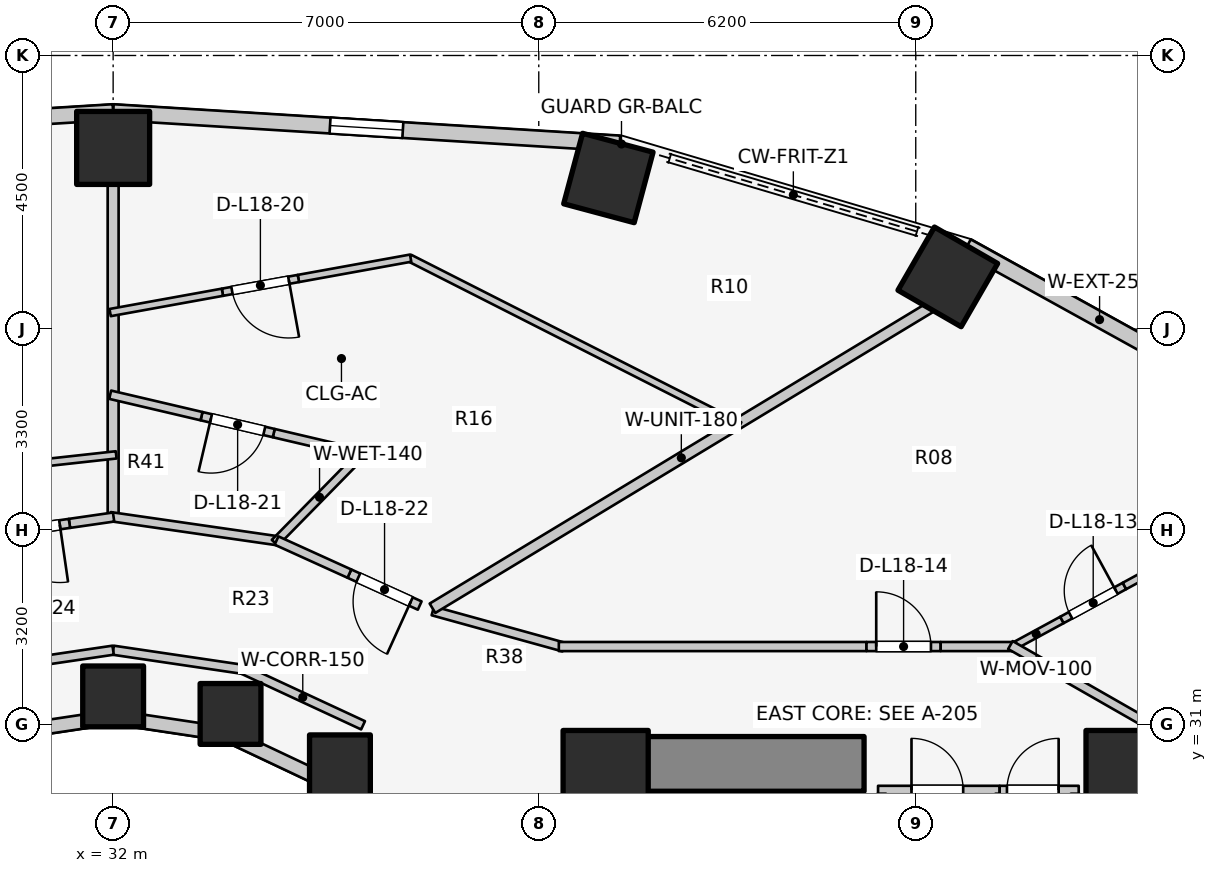
"""IFC4 building model, lengths in metres.
Left out: names, types, materials, properties, quantities, classifications, styles, units other than length and angle.
Written with IfcOpenShell. Run it as: python <this file> out.ifc"""

import sys

from ifc_helpers import new_model, si_unit, direction, frame, frame_2d, origin, origin_2d, place, context, subcontext, project, spatial, rectangle, extrude, element, fill, save


model = new_model("IFC4")
c1 = context("Model", 3, precision=1e-05, world=origin(), true_north=direction((0.0, 1.0)))
c2 = subcontext(c1, "Body", "Model", "MODEL_VIEW")
j1 = project(units=[si_unit("LENGTHUNIT", "METRE"), si_unit("PLANEANGLEUNIT", "RADIAN")], contexts=[c1])
p1 = place(None, origin())
s1 = spatial("IfcSite", under=j1, at=p1, CompositionType="ELEMENT")
p2 = place(p1, origin())
s2 = spatial("IfcBuilding", under=s1, at=p2, CompositionType="ELEMENT")
p3 = place(p2, frame((0.0, 0.0, 61.7)))
s3 = spatial("IfcBuildingStorey", under=s2, at=p3, CompositionType="ELEMENT", Elevation=61.7)
p4 = place(p3, frame((39.85, 30.35, 0.0), z_axis=(0.0, 0.0, 1.0), x_axis=(1.0, 0.0, 0.0)))
e1 = element("IfcWall", 1, at=p4, inside=s3, PredefinedType="SHEAR", context=c2, shape_type="SweptSolid", body=[
    extrude(rectangle(XDim=4.5, YDim=0.9, at=frame_2d((2.25, 0.0))), origin(), (0.0, 0.0, 1.0), 3.1),
])
for number, where, z_axis, x_axis in (
    (2, (48.7, 30.2, 0.0), (0.0, 0.0, 1.0), (1.0, 0.0, 0.0)),
    (3, (40.1, 30.2, 0.0), (0.0, 0.0, 1.0), (1.0, 0.0, 0.0)),
):
    element("IfcColumn", number, at=place(p3, frame(where, z_axis=z_axis, x_axis=x_axis)), inside=s3, PredefinedType="COLUMN", context=c2, shape_type="SweptSolid", body=[
        extrude(rectangle(XDim=1.4, YDim=1.4, at=origin_2d()), origin(), (0.0, 0.0, 1.0), 3.1),
    ])
p5 = place(p3, frame((35.73, 30.327, 0.0), z_axis=(0.0, 0.0, 1.0), x_axis=(1.0, 0.0, 0.0)))
e4 = element("IfcColumn", 4, at=p5, inside=s3, PredefinedType="COLUMN", context=c2, shape_type="SweptSolid", body=[
    extrude(rectangle(XDim=1.0, YDim=1.0, at=origin_2d()), origin(), (0.0, 0.0, 1.0), 3.1),
])
p6 = place(p3, frame((45.727, 38.359, 0.0), z_axis=(0.0, 0.0, 1.0), x_axis=(0.5, 0.866025403784, 0.0)))
e5 = element("IfcColumn", 5, at=p6, inside=s3, PredefinedType="COLUMN", context=c2, shape_type="SweptSolid", body=[
    extrude(rectangle(XDim=1.2, YDim=1.2, at=origin_2d()), origin(), (0.0, 0.0, 1.0), 3.1),
])
p7 = place(p3, frame((33.931, 31.172, 0.0), z_axis=(0.0, 0.0, 1.0), x_axis=(1.0, 0.0, 0.0)))
e6 = element("IfcColumn", 6, at=p7, inside=s3, PredefinedType="COLUMN", context=c2, shape_type="SweptSolid", body=[
    extrude(rectangle(XDim=1.0, YDim=1.0, at=origin_2d()), origin(), (0.0, 0.0, 1.0), 3.1),
])
p8 = place(p3, frame((40.145, 39.986, 0.0), z_axis=(0.0, 0.0, 1.0), x_axis=(0.258819045103, 0.965925826289, 0.0)))
e7 = element("IfcColumn", 7, at=p8, inside=s3, PredefinedType="COLUMN", context=c2, shape_type="SweptSolid", body=[
    extrude(rectangle(XDim=1.2, YDim=1.2, at=origin_2d()), origin(), (0.0, 0.0, 1.0), 3.1),
])
p9 = place(p3, frame((32.0, 31.46, 0.0), z_axis=(0.0, 0.0, 1.0), x_axis=(1.0, 0.0, 0.0)))
e8 = element("IfcColumn", 8, at=p9, inside=s3, PredefinedType="COLUMN", context=c2, shape_type="SweptSolid", body=[
    extrude(rectangle(XDim=1.0, YDim=1.0, at=origin_2d()), origin(), (0.0, 0.0, 1.0), 3.1),
])
p10 = place(p3, frame((32.0, 40.48, 0.0), z_axis=(0.0, 0.0, 1.0), x_axis=(0.0, 1.0, 0.0)))
e9 = element("IfcColumn", 9, at=p10, inside=s3, PredefinedType="COLUMN", context=c2, shape_type="SweptSolid", body=[
    extrude(rectangle(XDim=1.2, YDim=1.2, at=origin_2d()), origin(), (0.0, 0.0, 1.0), 3.1),
])
p11 = place(p3, frame((37.035, 28.742, 0.0), z_axis=(0.0, 0.0, 1.0), x_axis=(-0.752576694707, 0.658504607869, 0.0)))
e10 = element("IfcWall", 10, at=p11, inside=s3, PredefinedType="STANDARD", context=c2, shape_type="SweptSolid", body=[
    extrude(rectangle(XDim=1.959, YDim=0.23, at=frame_2d((0.98, 0.0))), origin(), (0.0, 0.0, 1.0), 1.22),
])
p12 = place(p3, frame((35.56, 30.032, 0.0), z_axis=(0.0, 0.0, 1.0), x_axis=(-0.904179699603, 0.427152280606, 0.0)))
e11 = element("IfcWall", 11, at=p12, inside=s3, PredefinedType="STANDARD", context=c2, shape_type="SweptSolid", body=[
    extrude(rectangle(XDim=1.899, YDim=0.23, at=frame_2d((0.95, 0.0))), origin(), (0.0, 0.0, 1.0), 1.22),
])
for number, where, z_axis, x_axis in (
    (12, (33.843, 30.843, 0.0), (0.0, 0.0, 1.0), (-0.989, 0.149, 0.0)),
    (13, (32.0, 31.12, 0.0), (0.0, 0.0, 1.0), (-0.989, -0.149, 0.0)),
):
    element("IfcWall", number, at=place(p3, frame(where, z_axis=z_axis, x_axis=x_axis)), inside=s3, PredefinedType="STANDARD", context=c2, shape_type="SweptSolid", body=[
        extrude(rectangle(XDim=1.864, YDim=0.23, at=frame_2d((0.932, 0.0))), origin(), (0.0, 0.0, 1.0), 1.22),
    ])
p13 = place(p3, frame((50.405, 36.45, 0.0), z_axis=(0.0, 0.0, 1.0), x_axis=(-0.875137303239, 0.483874674352, 0.0)))
e14 = element("IfcWall", 14, at=p13, inside=s3, PredefinedType="STANDARD", context=c2, shape_type="SweptSolid", body=[
    extrude(rectangle(XDim=4.985, YDim=0.26, at=frame_2d((2.493, 0.0))), origin(), (0.0, 0.0, 1.0), 1.22),
])
p14 = place(p3, frame((40.332, 40.553, 0.0), z_axis=(0.0, 0.0, 1.0), x_axis=(-0.998090514779, 0.061768311519, 0.0)))
e15 = element("IfcWall", 15, at=p14, inside=s3, PredefinedType="STANDARD", context=c2, shape_type="SweptSolid", body=[
    extrude(rectangle(XDim=8.348, YDim=0.26, at=frame_2d((4.174, 0.0))), origin(), (0.0, 0.0, 1.0), 1.22),
])
p15 = place(p14, frame((3.574, 0.0, 0.15)))
e16 = element("IfcOpeningElement", 16, at=p15, cuts=e15, PredefinedType="OPENING", context=c2, shape_type="SweptSolid", body=[
    extrude(rectangle(XDim=1.2, YDim=0.9, at=frame_2d((0.6, 0.45))), frame((0.0, 0.14, 0.0), z_axis=(0.0, -1.0, 0.0), x_axis=(1.0, 0.0, 0.0)), (0.0, 0.0, 1.0), 0.28),
])
p16 = place(p3, frame((32.0, 41.069, 0.0), z_axis=(0.0, 0.0, 1.0), x_axis=(-0.998090514779, -0.061768311519, 0.0)))
e17 = element("IfcWall", 17, at=p16, inside=s3, PredefinedType="STANDARD", context=c2, shape_type="SweptSolid", body=[
    extrude(rectangle(XDim=8.348, YDim=0.26, at=frame_2d((4.174, 0.0))), origin(), (0.0, 0.0, 1.0), 1.22),
])
p17 = place(p16, frame((3.574, 0.0, 0.15)))
e18 = element("IfcOpeningElement", 18, at=p17, cuts=e17, PredefinedType="OPENING", context=c2, shape_type="SweptSolid", body=[
    extrude(rectangle(XDim=1.2, YDim=0.9, at=frame_2d((0.6, 0.45))), frame((0.0, 0.14, 0.0), z_axis=(0.0, -1.0, 0.0), x_axis=(1.0, 0.0, 0.0)), (0.0, 0.0, 1.0), 0.28),
])
p18 = place(p3, frame((44.58, 29.92, 0.0), z_axis=(0.0, 0.0, 1.0), x_axis=(1.0, 0.0, 0.0)))
e19 = element("IfcWall", 19, at=p18, inside=s3, PredefinedType="PLUMBINGWALL", context=c2, shape_type="SweptSolid", body=[
    extrude(rectangle(XDim=2.0, YDim=0.14, at=frame_2d((1.0, 0.0))), origin(), (0.0, 0.0, 1.0), 2.575),
])
p19 = place(p18, frame((0.55, 0.0, 0.0)))
e20 = element("IfcOpeningElement", 20, at=p19, cuts=e19, PredefinedType="OPENING", context=c2, shape_type="SweptSolid", body=[
    extrude(rectangle(XDim=0.85, YDim=2.05, at=frame_2d((0.425, 1.025))), frame((0.0, 0.08, 0.0), z_axis=(0.0, -1.0, 0.0), x_axis=(1.0, 0.0, 0.0)), (0.0, 0.0, 1.0), 0.16),
])
p20 = place(p3, frame((46.58, 29.92, 0.0), z_axis=(0.0, 0.0, 1.0), x_axis=(1.0, 0.0, 0.0)))
e21 = element("IfcWall", 21, at=p20, inside=s3, PredefinedType="PLUMBINGWALL", context=c2, shape_type="SweptSolid", body=[
    extrude(rectangle(XDim=1.3, YDim=0.14, at=frame_2d((0.65, 0.0))), origin(), (0.0, 0.0, 1.0), 2.575),
])
p21 = place(p20, frame((0.12, 0.0, 0.0)))
e22 = element("IfcOpeningElement", 22, at=p21, cuts=e21, PredefinedType="OPENING", context=c2, shape_type="SweptSolid", body=[
    extrude(rectangle(XDim=0.85, YDim=2.05, at=frame_2d((0.425, 1.025))), frame((0.0, 0.08, 0.0), z_axis=(0.0, -1.0, 0.0), x_axis=(1.0, 0.0, 0.0)), (0.0, 0.0, 1.0), 0.16),
])
p22 = place(p3, frame((36.11, 30.985, 0.0), z_axis=(0.0, 0.0, 1.0), x_axis=(-0.906943449489, 0.421252393975, 0.0)))
e23 = element("IfcWall", 23, at=p22, inside=s3, PredefinedType="PARTITIONING", context=c2, shape_type="SweptSolid", body=[
    extrude(rectangle(XDim=2.186, YDim=0.15, at=frame_2d((1.093, 0.0))), origin(), (0.0, 0.0, 1.0), 1.22),
])
for number, where, z_axis, x_axis in (
    (24, (34.127, 31.906, 0.0), (0.0, 0.0, 1.0), (-0.989, 0.146, 0.0)),
    (25, (32.0, 32.22, 0.0), (0.0, 0.0, 1.0), (-0.989, -0.146, 0.0)),
):
    element("IfcWall", number, at=place(p3, frame(where, z_axis=z_axis, x_axis=x_axis)), inside=s3, PredefinedType="PARTITIONING", context=c2, shape_type="SweptSolid", body=[
        extrude(rectangle(XDim=2.151, YDim=0.15, at=frame_2d((1.075, 0.0))), origin(), (0.0, 0.0, 1.0), 1.22),
    ])
p23 = place(p3, frame((46.756, 32.256, 0.0), z_axis=(0.0, 0.0, 1.0), x_axis=(0.878580692024, 0.477593935894, 0.0)))
e26 = element("IfcWall", 26, at=p23, inside=s3, PredefinedType="MOVABLE", context=c2, shape_type="SweptSolid", body=[
    extrude(rectangle(XDim=0.966, YDim=0.12, at=frame_2d((0.483, 0.0))), origin(), (0.0, 0.0, 1.0), 2.575),
])
p24 = place(p3, frame((47.604, 32.717, 0.0), z_axis=(0.0, 0.0, 1.0), x_axis=(0.878540750178, 0.4776674055, 0.0)))
e27 = element("IfcWall", 27, at=p24, inside=s3, PredefinedType="MOVABLE", context=c2, shape_type="SweptSolid", body=[
    extrude(rectangle(XDim=1.17, YDim=0.12, at=frame_2d((0.585, 0.0))), origin(), (0.0, 0.0, 1.0), 2.11),
])
p25 = place(p24, frame((0.16, 0.0, 0.0)))
e28 = element("IfcOpeningElement", 28, at=p25, cuts=e27, PredefinedType="OPENING", context=c2, shape_type="SweptSolid", body=[
    extrude(rectangle(XDim=0.85, YDim=2.05, at=frame_2d((0.425, 1.025))), frame((0.0, 0.07, 0.0), z_axis=(0.0, -1.0, 0.0), x_axis=(1.0, 0.0, 0.0)), (0.0, 0.0, 1.0), 0.14),
])
p26 = place(p3, frame((48.632, 33.276, 0.0), z_axis=(0.0, 0.0, 1.0), x_axis=(0.878543913196, 0.477661587932, 0.0)))
e29 = element("IfcWall", 29, at=p26, inside=s3, PredefinedType="MOVABLE", context=c2, shape_type="SweptSolid", body=[
    extrude(rectangle(XDim=3.924, YDim=0.12, at=frame_2d((1.962, 0.0))), origin(), (0.0, 0.0, 1.0), 1.22),
])
p27 = place(p3, frame((37.258, 32.867, 0.0), z_axis=(0.0, 0.0, 1.0), x_axis=(0.963833843713, -0.266503886865, 0.0)))
e30 = element("IfcWall", 30, at=p27, inside=s3, PredefinedType="PARTITIONING", context=c2, shape_type="SweptSolid", body=[
    extrude(rectangle(XDim=2.232, YDim=0.15, at=frame_2d((1.116, 0.0))), origin(), (0.0, 0.0, 1.0), 1.22),
])
p28 = place(p3, frame((39.33, 32.28, 0.0), z_axis=(0.0, 0.0, 1.0), x_axis=(1.0, 0.0, 0.0)))
e31 = element("IfcWall", 31, at=p28, inside=s3, PredefinedType="PARTITIONING", context=c2, shape_type="SweptSolid", body=[
    extrude(rectangle(XDim=5.06, YDim=0.15, at=frame_2d((2.53, 0.0))), origin(), (0.0, 0.0, 1.0), 1.22),
])
p29 = place(p3, frame((44.39, 32.28, 0.0), z_axis=(0.0, 0.0, 1.0), x_axis=(1.0, 0.0, 0.0)))
e32 = element("IfcWall", 32, at=p29, inside=s3, PredefinedType="PARTITIONING", context=c2, shape_type="SweptSolid", body=[
    extrude(rectangle(XDim=1.22, YDim=0.15, at=frame_2d((0.61, 0.0))), origin(), (0.0, 0.0, 1.0), 2.16),
])
p30 = place(p29, frame((0.16, 0.0, 0.0)))
e33 = element("IfcOpeningElement", 33, at=p30, cuts=e32, PredefinedType="OPENING", context=c2, shape_type="SweptSolid", body=[
    extrude(rectangle(XDim=0.9, YDim=2.1, at=frame_2d((0.45, 1.05))), frame((0.0, 0.085, 0.0), z_axis=(0.0, -1.0, 0.0), x_axis=(1.0, 0.0, 0.0)), (0.0, 0.0, 1.0), 0.17),
])
p31 = place(p3, frame((45.61, 32.28, 0.0), z_axis=(0.0, 0.0, 1.0), x_axis=(1.0, 0.0, 0.0)))
e34 = element("IfcWall", 34, at=p31, inside=s3, PredefinedType="PARTITIONING", context=c2, shape_type="SweptSolid", body=[
    extrude(rectangle(XDim=1.24, YDim=0.15, at=frame_2d((0.62, 0.0))), origin(), (0.0, 0.0, 1.0), 2.575),
])
p32 = place(p3, frame((46.757, 32.305, 0.0), z_axis=(0.0, 0.0, 1.0), x_axis=(0.867991349648, -0.496579315857, 0.0)))
e35 = element("IfcWall", 35, at=p32, inside=s3, PredefinedType="PARTITIONING", context=c2, shape_type="SweptSolid", body=[
    extrude(rectangle(XDim=2.567, YDim=0.15, at=frame_2d((1.283, 0.0))), origin(), (0.0, 0.0, 1.0), 1.22),
])
p33 = place(p3, frame((37.252, 32.91, 0.0), z_axis=(0.0, 0.0, 1.0), x_axis=(0.855817136021, 0.517278483694, 0.0)))
e36 = element("IfcWall", 36, at=p33, inside=s3, PredefinedType="PARTITIONING", context=c2, shape_type="SweptSolid", body=[
    extrude(rectangle(XDim=9.564, YDim=0.18, at=frame_2d((4.782, 0.0))), origin(), (0.0, 0.0, 1.0), 1.22),
])
p34 = place(p3, frame((32.0, 34.465, 0.0), z_axis=(0.0, 0.0, 1.0), x_axis=(0.0, 1.0, 0.0)))
e37 = element("IfcWall", 37, at=p34, inside=s3, PredefinedType="PARTITIONING", context=c2, shape_type="SweptSolid", body=[
    extrude(rectangle(XDim=5.435, YDim=0.18, at=frame_2d((2.717, 0.0))), origin(), (0.0, 0.0, 1.0), 1.22),
])
p35 = place(p3, frame((42.305, 35.914, 0.0), z_axis=(0.0, 0.0, 1.0), x_axis=(-0.891749407737, 0.452529550195, 0.0)))
e38 = element("IfcWall", 38, at=p35, inside=s3, PredefinedType="MOVABLE", context=c2, shape_type="SweptSolid", body=[
    extrude(rectangle(XDim=6.09, YDim=0.12, at=frame_2d((3.045, 0.0))), origin(), (0.0, 0.0, 1.0), 1.22),
])
p36 = place(p3, frame((36.893, 38.667, 0.0), z_axis=(0.0, 0.0, 1.0), x_axis=(-0.984000828306, -0.178163884929, 0.0)))
e39 = element("IfcWall", 39, at=p36, inside=s3, PredefinedType="MOVABLE", context=c2, shape_type="SweptSolid", body=[
    extrude(rectangle(XDim=1.876, YDim=0.12, at=frame_2d((0.938, 0.0))), origin(), (0.0, 0.0, 1.0), 2.575),
])
p37 = place(p3, frame((35.047, 38.333, 0.0), z_axis=(0.0, 0.0, 1.0), x_axis=(-0.983955925846, -0.178411703631, 0.0)))
e40 = element("IfcWall", 40, at=p37, inside=s3, PredefinedType="MOVABLE", context=c2, shape_type="SweptSolid", body=[
    extrude(rectangle(XDim=1.27, YDim=0.12, at=frame_2d((0.635, 0.0))), origin(), (0.0, 0.0, 1.0), 2.575),
])
p38 = place(p37, frame((0.16, 0.0, 0.0)))
e41 = element("IfcOpeningElement", 41, at=p38, cuts=e40, PredefinedType="OPENING", context=c2, shape_type="SweptSolid", body=[
    extrude(rectangle(XDim=0.95, YDim=2.1, at=frame_2d((0.475, 1.05))), frame((0.0, 0.07, 0.0), z_axis=(0.0, -1.0, 0.0), x_axis=(1.0, 0.0, 0.0)), (0.0, 0.0, 1.0), 0.14),
])
p39 = place(p3, frame((33.797, 38.106, 0.0), z_axis=(0.0, 0.0, 1.0), x_axis=(-0.98400908714, -0.178118265278, 0.0)))
e42 = element("IfcWall", 42, at=p39, inside=s3, PredefinedType="MOVABLE", context=c2, shape_type="SweptSolid", body=[
    extrude(rectangle(XDim=1.876, YDim=0.12, at=frame_2d((0.938, 0.0))), origin(), (0.0, 0.0, 1.0), 1.22),
])
p40 = place(p3, frame((34.744, 34.014, 0.0), z_axis=(0.0, 0.0, 1.0), x_axis=(-0.989761784218, 0.142729150844, 0.0)))
e43 = element("IfcWall", 43, at=p40, inside=s3, PredefinedType="PARTITIONING", context=c2, shape_type="SweptSolid", body=[
    extrude(rectangle(XDim=2.822, YDim=0.15, at=frame_2d((1.411, 0.0))), origin(), (0.0, 0.0, 1.0), 1.22),
])
p41 = place(p3, frame((34.659, 33.986, 0.0), z_axis=(0.0, 0.0, 1.0), x_axis=(0.700331728855, 0.713817532398, 0.0)))
e44 = element("IfcWall", 44, at=p41, inside=s3, PredefinedType="PLUMBINGWALL", context=c2, shape_type="SweptSolid", body=[
    extrude(rectangle(XDim=2.1, YDim=0.14, at=frame_2d((1.05, 0.0))), origin(), (0.0, 0.0, 1.0), 2.105),
])
p42 = place(p3, frame((36.144, 35.438, 0.0), z_axis=(0.0, 0.0, 1.0), x_axis=(-0.973549808771, 0.228474877924, 0.0)))
e45 = element("IfcWall", 45, at=p42, inside=s3, PredefinedType="PLUMBINGWALL", context=c2, shape_type="SweptSolid", body=[
    extrude(rectangle(XDim=1.543, YDim=0.14, at=frame_2d((0.771, 0.0))), origin(), (0.0, 0.0, 1.0), 2.105),
])
p43 = place(p3, frame((34.641, 35.79, 0.0), z_axis=(0.0, 0.0, 1.0), x_axis=(-0.97353775554, 0.228526231619, 0.0)))
e46 = element("IfcWall", 46, at=p43, inside=s3, PredefinedType="PLUMBINGWALL", context=c2, shape_type="SweptSolid", body=[
    extrude(rectangle(XDim=1.22, YDim=0.14, at=frame_2d((0.61, 0.0))), origin(), (0.0, 0.0, 1.0), 2.16),
])
p44 = place(p43, frame((0.16, 0.0, 0.0)))
e47 = element("IfcOpeningElement", 47, at=p44, cuts=e46, PredefinedType="OPENING", context=c2, shape_type="SweptSolid", body=[
    extrude(rectangle(XDim=0.9, YDim=2.1, at=frame_2d((0.45, 1.05))), frame((0.0, 0.08, 0.0), z_axis=(0.0, -1.0, 0.0), x_axis=(1.0, 0.0, 0.0)), (0.0, 0.0, 1.0), 0.16),
])
p45 = place(p3, frame((33.454, 36.069, 0.0), z_axis=(0.0, 0.0, 1.0), x_axis=(-0.973549808771, 0.228474877924, 0.0)))
e48 = element("IfcWall", 48, at=p45, inside=s3, PredefinedType="PLUMBINGWALL", context=c2, shape_type="SweptSolid", body=[
    extrude(rectangle(XDim=1.543, YDim=0.14, at=frame_2d((0.771, 0.0))), origin(), (0.0, 0.0, 1.0), 1.22),
])
p46 = place(p3, frame((37.042, 32.954, 0.0), z_axis=(0.0, 0.0, 1.0), x_axis=(-0.910596749825, 0.413295970472, 0.0)))
e49 = element("IfcWall", 49, at=p46, inside=s3, PredefinedType="PARTITIONING", context=c2, shape_type="SweptSolid", body=[
    extrude(rectangle(XDim=1.27, YDim=0.15, at=frame_2d((0.635, 0.0))), origin(), (0.0, 0.0, 1.0), 2.16),
])
p47 = place(p46, frame((0.16, 0.0, 0.0)))
e50 = element("IfcOpeningElement", 50, at=p47, cuts=e49, PredefinedType="OPENING", context=c2, shape_type="SweptSolid", body=[
    extrude(rectangle(XDim=0.95, YDim=2.1, at=frame_2d((0.475, 1.05))), frame((0.0, 0.085, 0.0), z_axis=(0.0, -1.0, 0.0), x_axis=(1.0, 0.0, 0.0)), (0.0, 0.0, 1.0), 0.17),
])
p48 = place(p3, frame((35.885, 33.479, 0.0), z_axis=(0.0, 0.0, 1.0), x_axis=(-0.910569685542, 0.413355594822, 0.0)))
e51 = element("IfcWall", 51, at=p48, inside=s3, PredefinedType="PARTITIONING", context=c2, shape_type="SweptSolid", body=[
    extrude(rectangle(XDim=1.316, YDim=0.15, at=frame_2d((0.658, 0.0))), origin(), (0.0, 0.0, 1.0), 1.22),
])
p49 = place(p3, frame((32.05, 35.432, 0.0), z_axis=(0.0, 0.0, 1.0), x_axis=(-0.993986922288, -0.109498850775, 0.0)))
e52 = element("IfcWall", 52, at=p49, inside=s3, PredefinedType="MOVABLE", context=c2, shape_type="SweptSolid", body=[
    extrude(rectangle(XDim=1.264, YDim=0.12, at=frame_2d((0.632, 0.0))), origin(), (0.0, 0.0, 1.0), 1.22),
])
p50 = place(p3, frame((32.007, 34.41, 0.0), z_axis=(0.0, 0.0, 1.0), x_axis=(-0.989795766197, -0.142493302365, 0.0)))
e53 = element("IfcWall", 53, at=p50, inside=s3, PredefinedType="PARTITIONING", context=c2, shape_type="SweptSolid", body=[
    extrude(rectangle(XDim=0.733, YDim=0.15, at=frame_2d((0.367, 0.0))), origin(), (0.0, 0.0, 1.0), 1.22),
])
p51 = place(p3, frame((31.281, 34.305, 0.0), z_axis=(0.0, 0.0, 1.0), x_axis=(-0.989721405299, -0.14300888047, 0.0)))
e54 = element("IfcWall", 54, at=p51, inside=s3, PredefinedType="PARTITIONING", context=c2, shape_type="SweptSolid", body=[
    extrude(rectangle(XDim=1.27, YDim=0.15, at=frame_2d((0.635, 0.0))), origin(), (0.0, 0.0, 1.0), 2.575),
])
p52 = place(p51, frame((0.16, 0.0, 0.0)))
e55 = element("IfcOpeningElement", 55, at=p52, cuts=e54, PredefinedType="OPENING", context=c2, shape_type="SweptSolid", body=[
    extrude(rectangle(XDim=0.95, YDim=2.1, at=frame_2d((0.475, 1.05))), frame((0.0, 0.085, 0.0), z_axis=(0.0, -1.0, 0.0), x_axis=(1.0, 0.0, 0.0)), (0.0, 0.0, 1.0), 0.17),
])
p53 = place(p15, origin())
e56 = element("IfcWindow", 56, at=p53, inside=s3, PartitioningType="SINGLE_PANEL", PredefinedType="WINDOW", context=c2, shape_type="SweptSolid", body=[
    extrude(rectangle(XDim=1.2, YDim=0.9, at=frame_2d((0.6, 0.45))), frame((0.0, 0.03, 0.0), z_axis=(0.0, -1.0, 0.0), x_axis=(1.0, 0.0, 0.0)), (0.0, 0.0, 1.0), 0.06),
])
fill(e16, e56)
p54 = place(p19, origin())
e57 = element("IfcDoor", 57, at=p54, inside=s3, OperationType="SINGLE_SWING_LEFT", PredefinedType="DOOR", context=c2, shape_type="SweptSolid", body=[
    extrude(rectangle(XDim=0.85, YDim=2.05, at=frame_2d((0.425, 1.025))), frame((0.0, 0.025, 0.0), z_axis=(0.0, -1.0, 0.0), x_axis=(1.0, 0.0, 0.0)), (0.0, 0.0, 1.0), 0.05),
])
fill(e20, e57)
p55 = place(p21, origin())
e58 = element("IfcDoor", 58, at=p55, inside=s3, OperationType="SINGLE_SWING_RIGHT", PredefinedType="DOOR", context=c2, shape_type="SweptSolid", body=[
    extrude(rectangle(XDim=0.85, YDim=2.05, at=frame_2d((0.425, 1.025))), frame((0.0, 0.025, 0.0), z_axis=(0.0, -1.0, 0.0), x_axis=(1.0, 0.0, 0.0)), (0.0, 0.0, 1.0), 0.05),
])
fill(e22, e58)
p56 = place(p25, origin())
e59 = element("IfcDoor", 59, at=p56, inside=s3, OperationType="SINGLE_SWING_RIGHT", PredefinedType="DOOR", context=c2, shape_type="SweptSolid", body=[
    extrude(rectangle(XDim=0.85, YDim=2.05, at=frame_2d((0.425, 1.025))), frame((0.0, 0.025, 0.0), z_axis=(0.0, -1.0, 0.0), x_axis=(1.0, 0.0, 0.0)), (0.0, 0.0, 1.0), 0.05),
])
fill(e28, e59)
p57 = place(p30, origin())
e60 = element("IfcDoor", 60, at=p57, inside=s3, OperationType="SINGLE_SWING_LEFT", PredefinedType="DOOR", context=c2, shape_type="SweptSolid", body=[
    extrude(rectangle(XDim=0.9, YDim=2.1, at=frame_2d((0.45, 1.05))), frame((0.0, 0.025, 0.0), z_axis=(0.0, -1.0, 0.0), x_axis=(1.0, 0.0, 0.0)), (0.0, 0.0, 1.0), 0.05),
])
fill(e33, e60)
p58 = place(p38, origin())
e61 = element("IfcDoor", 61, at=p58, inside=s3, OperationType="SINGLE_SWING_LEFT", PredefinedType="DOOR", context=c2, shape_type="SweptSolid", body=[
    extrude(rectangle(XDim=0.95, YDim=2.1, at=frame_2d((0.475, 1.05))), frame((0.0, 0.025, 0.0), z_axis=(0.0, -1.0, 0.0), x_axis=(1.0, 0.0, 0.0)), (0.0, 0.0, 1.0), 0.05),
])
fill(e41, e61)
p59 = place(p44, origin())
e62 = element("IfcDoor", 62, at=p59, inside=s3, OperationType="SINGLE_SWING_RIGHT", PredefinedType="DOOR", context=c2, shape_type="SweptSolid", body=[
    extrude(rectangle(XDim=0.9, YDim=2.1, at=frame_2d((0.45, 1.05))), frame((0.0, 0.025, 0.0), z_axis=(0.0, -1.0, 0.0), x_axis=(1.0, 0.0, 0.0)), (0.0, 0.0, 1.0), 0.05),
])
fill(e47, e62)
p60 = place(p47, origin())
e63 = element("IfcDoor", 63, at=p60, inside=s3, OperationType="SINGLE_SWING_LEFT", PredefinedType="DOOR", context=c2, shape_type="SweptSolid", body=[
    extrude(rectangle(XDim=0.95, YDim=2.1, at=frame_2d((0.475, 1.05))), frame((0.0, 0.025, 0.0), z_axis=(0.0, -1.0, 0.0), x_axis=(1.0, 0.0, 0.0)), (0.0, 0.0, 1.0), 0.05),
])
fill(e50, e63)
p61 = place(p52, origin())
e64 = element("IfcDoor", 64, at=p61, inside=s3, OperationType="SINGLE_SWING_LEFT", PredefinedType="DOOR", context=c2, shape_type="SweptSolid", body=[
    extrude(rectangle(XDim=0.95, YDim=2.1, at=frame_2d((0.475, 1.05))), frame((0.0, 0.025, 0.0), z_axis=(0.0, -1.0, 0.0), x_axis=(1.0, 0.0, 0.0)), (0.0, 0.0, 1.0), 0.05),
])
fill(e55, e64)
save(model, sys.argv[1])
